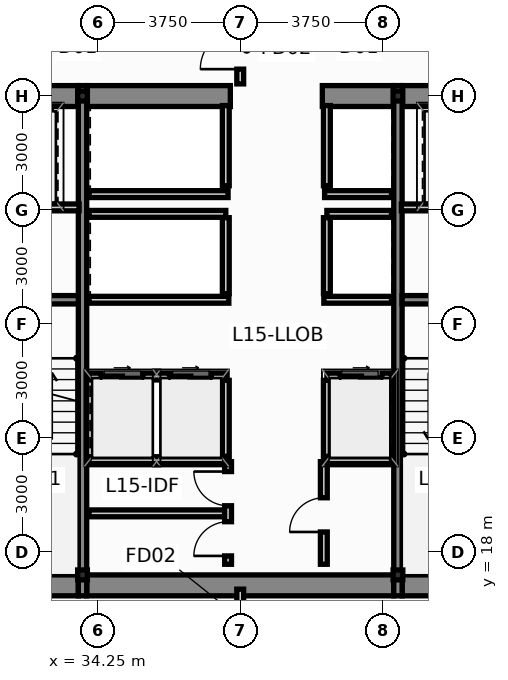
"""IFC4 building model, lengths in metres.
Left out: names, types, materials, properties, quantities, classifications, styles, units other than length and angle.
Written with IfcOpenShell. Run it as: python <this file> out.ifc"""

import sys

from ifc_helpers import new_model, si_unit, direction, frame, frame_2d, origin, origin_2d, place, context, subcontext, project, spatial, rectangle, i_section, extrude, source, transform, mapped, element, fill, save


model = new_model("IFC4")
c1 = context("Model", 3, precision=1e-05, world=origin(), true_north=direction((0.0, 1.0)))
c2 = subcontext(c1, "Body", "Model", "MODEL_VIEW")
j1 = project(units=[si_unit("LENGTHUNIT", "METRE"), si_unit("PLANEANGLEUNIT", "RADIAN")], contexts=[c1])
p1 = place(None, origin())
s1 = spatial("IfcSite", under=j1, at=p1, CompositionType="ELEMENT")
p2 = place(p1, origin())
s2 = spatial("IfcBuilding", under=s1, at=p2, CompositionType="ELEMENT")
p3 = place(p2, frame((0.0, 0.0, 60.45)))
s3 = spatial("IfcBuildingStorey", under=s2, at=p3, CompositionType="ELEMENT", Elevation=60.45)
m1 = source(origin(), c2, "Body", "SweptSolid", [
    extrude(i_section(OverallWidth=0.256, OverallDepth=0.26, WebThickness=0.01, FlangeThickness=0.017, at=origin_2d()), origin(), (0.0, 0.0, 1.0), 3.65),
])
for number, where, z_axis, x_axis in (
    (1, (33.85, 17.4, 0.0), (0.0, 0.0, 1.0), (1.0, 0.0, 0.0)),
    (2, (42.15, 17.4, 0.0), (0.0, 0.0, 1.0), (1.0, 0.0, 0.0)),
    (3, (33.85, 30.0, 0.0), (0.0, 0.0, 1.0), (1.0, 0.0, 0.0)),
    (4, (42.15, 30.0, 0.0), (0.0, 0.0, 1.0), (1.0, 0.0, 0.0)),
):
    element("IfcColumn", number, at=place(p3, frame(where, z_axis=z_axis, x_axis=x_axis)), inside=s3, PredefinedType="COLUMN", context=c2, shape_type="MappedRepresentation", body=[
        mapped(m1, transform((0.0, 0.0, 0.0), scale=1.0)),
    ])
p4 = place(p3, frame((30.84, 17.125, 0.0), z_axis=(0.0, 0.0, 1.0), x_axis=(1.0, 0.0, 0.0)))
e5 = element("IfcWall", 5, at=p4, inside=s3, PredefinedType="SHEAR", context=c2, shape_type="SweptSolid", body=[
    extrude(rectangle(XDim=2.9, YDim=0.55, at=frame_2d((1.45, 0.0))), origin(), (0.0, 0.0, 1.0), 3.65),
])
p5 = place(p3, frame((33.96, 17.125, 0.0), z_axis=(0.0, 0.0, 1.0), x_axis=(1.0, 0.0, 0.0)))
e6 = element("IfcWall", 6, at=p5, inside=s3, PredefinedType="SHEAR", context=c2, shape_type="SweptSolid", body=[
    extrude(rectangle(XDim=8.08, YDim=0.55, at=frame_2d((4.04, 0.0))), origin(), (0.0, 0.0, 1.0), 3.65),
])
for number, where, z_axis, x_axis in (
    (7, (42.26, 17.125, 0.0), (0.0, 0.0, 1.0), (1.0, 0.0, 0.0)),
    (8, (30.84, 30.0, 0.0), (0.0, 0.0, 1.0), (1.0, 0.0, 0.0)),
):
    element("IfcWall", number, at=place(p3, frame(where, z_axis=z_axis, x_axis=x_axis)), inside=s3, PredefinedType="SHEAR", context=c2, shape_type="SweptSolid", body=[
        extrude(rectangle(XDim=2.9, YDim=0.55, at=frame_2d((1.45, 0.0))), origin(), (0.0, 0.0, 1.0), 3.65),
    ])
p6 = place(p3, frame((33.96, 30.0, 0.0), z_axis=(0.0, 0.0, 1.0), x_axis=(1.0, 0.0, 0.0)))
e9 = element("IfcWall", 9, at=p6, inside=s3, PredefinedType="SHEAR", context=c2, shape_type="SweptSolid", body=[
    extrude(rectangle(XDim=3.78, YDim=0.55, at=frame_2d((1.89, 0.0))), origin(), (0.0, 0.0, 1.0), 3.65),
])
p7 = place(p3, frame((40.16, 30.0, 0.0), z_axis=(0.0, 0.0, 1.0), x_axis=(1.0, 0.0, 0.0)))
e10 = element("IfcWall", 10, at=p7, inside=s3, PredefinedType="SHEAR", context=c2, shape_type="SweptSolid", body=[
    extrude(rectangle(XDim=1.88, YDim=0.55, at=frame_2d((0.94, 0.0))), origin(), (0.0, 0.0, 1.0), 3.65),
])
p8 = place(p3, frame((42.26, 30.0, 0.0), z_axis=(0.0, 0.0, 1.0), x_axis=(1.0, 0.0, 0.0)))
e11 = element("IfcWall", 11, at=p8, inside=s3, PredefinedType="SHEAR", context=c2, shape_type="SweptSolid", body=[
    extrude(rectangle(XDim=2.9, YDim=0.55, at=frame_2d((1.45, 0.0))), origin(), (0.0, 0.0, 1.0), 3.65),
])
for number, where, z_axis, x_axis in (
    (12, (33.85, 16.85, 0.0), (0.0, 0.0, 1.0), (0.0, 1.0, 0.0)),
    (13, (42.15, 16.85, 0.0), (0.0, 0.0, 1.0), (0.0, 1.0, 0.0)),
):
    element("IfcWall", number, at=place(p3, frame(where, z_axis=z_axis, x_axis=x_axis)), inside=s3, PredefinedType="SHEAR", context=c2, shape_type="SweptSolid", body=[
        extrude(rectangle(XDim=13.425, YDim=0.22, at=frame_2d((6.712, 0.0))), origin(), (0.0, 0.0, 1.0), 3.65),
    ])
for number, where, z_axis, x_axis in (
    (14, (30.84, 24.64, 0.0), (0.0, 0.0, 1.0), (1.0, 0.0, 0.0)),
    (15, (42.26, 24.64, 0.0), (0.0, 0.0, 1.0), (1.0, 0.0, 0.0)),
):
    element("IfcWall", number, at=place(p3, frame(where, z_axis=z_axis, x_axis=x_axis)), inside=s3, PredefinedType="SHEAR", context=c2, shape_type="SweptSolid", body=[
        extrude(rectangle(XDim=2.9, YDim=0.22, at=frame_2d((1.45, 0.0))), origin(), (0.0, 0.0, 1.0), 3.65),
    ])
p9 = place(p3, frame((34.02, 22.62, 0.0), z_axis=(0.0, 0.0, 1.0), x_axis=(1.0, 0.0, 0.0)))
e16 = element("IfcWall", 16, at=p9, inside=s3, PredefinedType="PARTITIONING", context=c2, shape_type="SweptSolid", body=[
    extrude(rectangle(XDim=3.6, YDim=0.18, at=frame_2d((1.8, 0.0))), origin(), (0.0, 0.0, 1.0), 3.4),
])
p10 = place(p9, frame((0.32, 0.0, 0.0)))
e17 = element("IfcOpeningElement", 17, at=p10, cuts=e16, PredefinedType="OPENING", context=c2, shape_type="SweptSolid", body=[
    extrude(rectangle(XDim=1.1, YDim=2.2, at=frame_2d((0.55, 1.1))), frame((0.0, 0.102, 0.0), z_axis=(0.0, -1.0, 0.0), x_axis=(1.0, 0.0, 0.0)), (0.0, 0.0, 1.0), 0.204),
])
p11 = place(p9, frame((2.12, 0.0, 0.0)))
e18 = element("IfcOpeningElement", 18, at=p11, cuts=e16, PredefinedType="OPENING", context=c2, shape_type="SweptSolid", body=[
    extrude(rectangle(XDim=1.1, YDim=2.2, at=frame_2d((0.55, 1.1))), frame((0.0, 0.102, 0.0), z_axis=(0.0, -1.0, 0.0), x_axis=(1.0, 0.0, 0.0)), (0.0, 0.0, 1.0), 0.204),
])
p12 = place(p3, frame((40.28, 22.62, 0.0), z_axis=(0.0, 0.0, 1.0), x_axis=(1.0, 0.0, 0.0)))
e19 = element("IfcWall", 19, at=p12, inside=s3, PredefinedType="PARTITIONING", context=c2, shape_type="SweptSolid", body=[
    extrude(rectangle(XDim=1.7, YDim=0.18, at=frame_2d((0.85, 0.0))), origin(), (0.0, 0.0, 1.0), 3.4),
])
p13 = place(p12, frame((0.35, 0.0, 0.0)))
e20 = element("IfcOpeningElement", 20, at=p13, cuts=e19, PredefinedType="OPENING", context=c2, shape_type="SweptSolid", body=[
    extrude(rectangle(XDim=1.1, YDim=2.2, at=frame_2d((0.55, 1.1))), frame((0.0, 0.102, 0.0), z_axis=(0.0, -1.0, 0.0), x_axis=(1.0, 0.0, 0.0)), (0.0, 0.0, 1.0), 0.204),
])
for number, where, z_axis, x_axis in (
    (21, (37.62, 20.52, 0.0), (0.0, 0.0, 1.0), (0.0, 1.0, 0.0)),
    (22, (40.28, 20.52, 0.0), (0.0, 0.0, 1.0), (0.0, 1.0, 0.0)),
):
    element("IfcWall", number, at=place(p3, frame(where, z_axis=z_axis, x_axis=x_axis)), inside=s3, PredefinedType="PARTITIONING", context=c2, shape_type="SweptSolid", body=[
        extrude(rectangle(XDim=2.0, YDim=0.18, at=frame_2d((1.0, 0.0))), origin(), (0.0, 0.0, 1.0), 3.4),
    ])
p14 = place(p3, frame((34.02, 26.9, 0.0), z_axis=(0.0, 0.0, 1.0), x_axis=(1.0, 0.0, 0.0)))
e23 = element("IfcWall", 23, at=p14, inside=s3, PredefinedType="PARTITIONING", context=c2, shape_type="SweptSolid", body=[
    extrude(rectangle(XDim=3.6, YDim=0.18, at=frame_2d((1.8, 0.0))), origin(), (0.0, 0.0, 1.0), 3.4),
])
p15 = place(p3, frame((40.28, 26.9, 0.0), z_axis=(0.0, 0.0, 1.0), x_axis=(1.0, 0.0, 0.0)))
e24 = element("IfcWall", 24, at=p15, inside=s3, PredefinedType="PARTITIONING", context=c2, shape_type="SweptSolid", body=[
    extrude(rectangle(XDim=1.7, YDim=0.18, at=frame_2d((0.85, 0.0))), origin(), (0.0, 0.0, 1.0), 3.4),
])
for number, where, z_axis, x_axis in (
    (25, (37.62, 24.8, 0.0), (0.0, 0.0, 1.0), (0.0, 1.0, 0.0)),
    (26, (40.28, 24.8, 0.0), (0.0, 0.0, 1.0), (0.0, 1.0, 0.0)),
):
    element("IfcWall", number, at=place(p3, frame(where, z_axis=z_axis, x_axis=x_axis)), inside=s3, PredefinedType="PARTITIONING", context=c2, shape_type="SweptSolid", body=[
        extrude(rectangle(XDim=2.0, YDim=0.18, at=frame_2d((1.0, 0.0))), origin(), (0.0, 0.0, 1.0), 3.4),
    ])
p16 = place(p3, frame((34.02, 24.64, 0.0), z_axis=(0.0, 0.0, 1.0), x_axis=(1.0, 0.0, 0.0)))
e27 = element("IfcWall", 27, at=p16, inside=s3, PredefinedType="PARTITIONING", context=c2, shape_type="SweptSolid", body=[
    extrude(rectangle(XDim=3.68, YDim=0.18, at=frame_2d((1.84, 0.0))), origin(), (0.0, 0.0, 1.0), 3.4),
])
p17 = place(p3, frame((40.2, 24.64, 0.0), z_axis=(0.0, 0.0, 1.0), x_axis=(1.0, 0.0, 0.0)))
e28 = element("IfcWall", 28, at=p17, inside=s3, PredefinedType="PARTITIONING", context=c2, shape_type="SweptSolid", body=[
    extrude(rectangle(XDim=1.78, YDim=0.18, at=frame_2d((0.89, 0.0))), origin(), (0.0, 0.0, 1.0), 3.4),
])
p18 = place(p3, frame((34.02, 27.42, 0.0), z_axis=(0.0, 0.0, 1.0), x_axis=(1.0, 0.0, 0.0)))
e29 = element("IfcWall", 29, at=p18, inside=s3, PredefinedType="PARTITIONING", context=c2, shape_type="SweptSolid", body=[
    extrude(rectangle(XDim=3.66, YDim=0.18, at=frame_2d((1.83, 0.0))), origin(), (0.0, 0.0, 1.0), 3.4),
])
p19 = place(p3, frame((40.22, 27.42, 0.0), z_axis=(0.0, 0.0, 1.0), x_axis=(1.0, 0.0, 0.0)))
e30 = element("IfcWall", 30, at=p19, inside=s3, PredefinedType="PARTITIONING", context=c2, shape_type="SweptSolid", body=[
    extrude(rectangle(XDim=1.76, YDim=0.18, at=frame_2d((0.88, 0.0))), origin(), (0.0, 0.0, 1.0), 3.4),
])
for number, where, z_axis, x_axis in (
    (31, (37.62, 27.64, 0.0), (0.0, 0.0, 1.0), (0.0, 1.0, 0.0)),
    (32, (40.28, 27.64, 0.0), (0.0, 0.0, 1.0), (0.0, 1.0, 0.0)),
):
    element("IfcWall", number, at=place(p3, frame(where, z_axis=z_axis, x_axis=x_axis)), inside=s3, PredefinedType="PARTITIONING", context=c2, shape_type="SweptSolid", body=[
        extrude(rectangle(XDim=2.11, YDim=0.18, at=frame_2d((1.055, 0.0))), origin(), (0.0, 0.0, 1.0), 3.4),
    ])
for number, where, z_axis, x_axis in (
    (33, (30.86, 27.07, 0.0), (0.0, 0.0, 1.0), (1.0, 0.0, 0.0)),
    (34, (42.24, 27.07, 0.0), (0.0, 0.0, 1.0), (1.0, 0.0, 0.0)),
):
    element("IfcWall", number, at=place(p3, frame(where, z_axis=z_axis, x_axis=x_axis)), inside=s3, PredefinedType="PARTITIONING", context=c2, shape_type="SweptSolid", body=[
        extrude(rectangle(XDim=2.9, YDim=0.18, at=frame_2d((1.45, 0.0))), origin(), (0.0, 0.0, 1.0), 3.4),
    ])
p20 = place(p3, frame((34.02, 20.42, 0.0), z_axis=(0.0, 0.0, 1.0), x_axis=(1.0, 0.0, 0.0)))
e35 = element("IfcWall", 35, at=p20, inside=s3, PredefinedType="PARTITIONING", context=c2, shape_type="SweptSolid", body=[
    extrude(rectangle(XDim=3.64, YDim=0.18, at=frame_2d((1.82, 0.0))), origin(), (0.0, 0.0, 1.0), 3.4),
])
p21 = place(p3, frame((40.22, 20.42, 0.0), z_axis=(0.0, 0.0, 1.0), x_axis=(1.0, 0.0, 0.0)))
e36 = element("IfcWall", 36, at=p21, inside=s3, PredefinedType="PARTITIONING", context=c2, shape_type="SweptSolid", body=[
    extrude(rectangle(XDim=1.76, YDim=0.18, at=frame_2d((0.88, 0.0))), origin(), (0.0, 0.0, 1.0), 3.4),
])
p22 = place(p3, frame((34.02, 19.02, 0.0), z_axis=(0.0, 0.0, 1.0), x_axis=(1.0, 0.0, 0.0)))
e37 = element("IfcWall", 37, at=p22, inside=s3, PredefinedType="PARTITIONING", context=c2, shape_type="SweptSolid", body=[
    extrude(rectangle(XDim=3.58, YDim=0.18, at=frame_2d((1.79, 0.0))), origin(), (0.0, 0.0, 1.0), 3.4),
])
p23 = place(p3, frame((37.68, 17.68, 0.0), z_axis=(0.0, 0.0, 1.0), x_axis=(0.0, 1.0, 0.0)))
e38 = element("IfcWall", 38, at=p23, inside=s3, PredefinedType="PARTITIONING", context=c2, shape_type="SweptSolid", body=[
    extrude(rectangle(XDim=2.7, YDim=0.18, at=frame_2d((1.35, 0.0))), origin(), (0.0, 0.0, 1.0), 3.4),
])
p24 = place(p23, frame((0.22, 0.0, 0.0)))
e39 = element("IfcOpeningElement", 39, at=p24, cuts=e38, PredefinedType="OPENING", context=c2, shape_type="SweptSolid", body=[
    extrude(rectangle(XDim=0.9, YDim=2.1, at=frame_2d((0.45, 1.05))), frame((0.0, 0.102, 0.0), z_axis=(0.0, -1.0, 0.0), x_axis=(1.0, 0.0, 0.0)), (0.0, 0.0, 1.0), 0.204),
])
p25 = place(p23, frame((1.54, 0.0, 0.0)))
e40 = element("IfcOpeningElement", 40, at=p25, cuts=e38, PredefinedType="OPENING", context=c2, shape_type="SweptSolid", body=[
    extrude(rectangle(XDim=0.9, YDim=2.1, at=frame_2d((0.45, 1.05))), frame((0.0, 0.102, 0.0), z_axis=(0.0, -1.0, 0.0), x_axis=(1.0, 0.0, 0.0)), (0.0, 0.0, 1.0), 0.204),
])
p26 = place(p3, frame((40.2, 17.68, 0.0), z_axis=(0.0, 0.0, 1.0), x_axis=(0.0, 1.0, 0.0)))
e41 = element("IfcWall", 41, at=p26, inside=s3, PredefinedType="PARTITIONING", context=c2, shape_type="SweptSolid", body=[
    extrude(rectangle(XDim=2.7, YDim=0.18, at=frame_2d((1.35, 0.0))), origin(), (0.0, 0.0, 1.0), 3.4),
])
p27 = place(p26, frame((0.85, 0.0, 0.0)))
e42 = element("IfcOpeningElement", 42, at=p27, cuts=e41, PredefinedType="OPENING", context=c2, shape_type="SweptSolid", body=[
    extrude(rectangle(XDim=0.9, YDim=2.1, at=frame_2d((0.45, 1.05))), frame((0.0, 0.102, 0.0), z_axis=(0.0, -1.0, 0.0), x_axis=(1.0, 0.0, 0.0)), (0.0, 0.0, 1.0), 0.204),
])
p28 = place(p3, frame((38.0, 15.205, 0.0), z_axis=(0.0, 0.0, 1.0), x_axis=(0.0, 1.0, 0.0)))
e43 = element("IfcWall", 43, at=p28, inside=s3, PredefinedType="PARTITIONING", context=c2, shape_type="SweptSolid", body=[
    extrude(rectangle(XDim=1.82, YDim=0.18, at=frame_2d((0.91, 0.0))), origin(), (0.0, 0.0, 1.0), 3.4),
])
p29 = place(p28, frame((0.385, 0.0, 0.0)))
e44 = element("IfcOpeningElement", 44, at=p29, cuts=e43, PredefinedType="OPENING", context=c2, shape_type="SweptSolid", body=[
    extrude(rectangle(XDim=1.05, YDim=2.15, at=frame_2d((0.525, 1.075))), frame((0.0, 0.102, 0.0), z_axis=(0.0, -1.0, 0.0), x_axis=(1.0, 0.0, 0.0)), (0.0, 0.0, 1.0), 0.204),
])
p30 = place(p3, frame((38.0, 30.32, 0.0), z_axis=(0.0, 0.0, 1.0), x_axis=(0.0, 1.0, 0.0)))
e45 = element("IfcWall", 45, at=p30, inside=s3, PredefinedType="PARTITIONING", context=c2, shape_type="SweptSolid", body=[
    extrude(rectangle(XDim=1.825, YDim=0.18, at=frame_2d((0.913, 0.0))), origin(), (0.0, 0.0, 1.0), 3.4),
])
p31 = place(p30, frame((0.388, 0.0, 0.0)))
e46 = element("IfcOpeningElement", 46, at=p31, cuts=e45, PredefinedType="OPENING", context=c2, shape_type="SweptSolid", body=[
    extrude(rectangle(XDim=1.05, YDim=2.15, at=frame_2d((0.525, 1.075))), frame((0.0, 0.102, 0.0), z_axis=(0.0, -1.0, 0.0), x_axis=(1.0, 0.0, 0.0)), (0.0, 0.0, 1.0), 0.204),
])
p32 = place(p10, origin())
e47 = element("IfcDoor", 47, at=p32, inside=s3, OperationType="SLIDING_TO_LEFT", PredefinedType="DOOR", context=c2, shape_type="SweptSolid", body=[
    extrude(rectangle(XDim=1.1, YDim=2.2, at=frame_2d((0.55, 1.1))), frame((0.0, 0.025, 0.0), z_axis=(0.0, -1.0, 0.0), x_axis=(1.0, 0.0, 0.0)), (0.0, 0.0, 1.0), 0.05),
])
fill(e17, e47)
p33 = place(p11, origin())
e48 = element("IfcDoor", 48, at=p33, inside=s3, OperationType="SLIDING_TO_RIGHT", PredefinedType="DOOR", context=c2, shape_type="SweptSolid", body=[
    extrude(rectangle(XDim=1.1, YDim=2.2, at=frame_2d((0.55, 1.1))), frame((0.0, 0.025, 0.0), z_axis=(0.0, -1.0, 0.0), x_axis=(1.0, 0.0, 0.0)), (0.0, 0.0, 1.0), 0.05),
])
fill(e18, e48)
p34 = place(p13, origin())
e49 = element("IfcDoor", 49, at=p34, inside=s3, OperationType="SLIDING_TO_LEFT", PredefinedType="DOOR", context=c2, shape_type="SweptSolid", body=[
    extrude(rectangle(XDim=1.1, YDim=2.2, at=frame_2d((0.55, 1.1))), frame((0.0, 0.025, 0.0), z_axis=(0.0, -1.0, 0.0), x_axis=(1.0, 0.0, 0.0)), (0.0, 0.0, 1.0), 0.05),
])
fill(e20, e49)
p35 = place(p24, origin())
e50 = element("IfcDoor", 50, at=p35, inside=s3, OperationType="SINGLE_SWING_LEFT", PredefinedType="DOOR", context=c2, shape_type="SweptSolid", body=[
    extrude(rectangle(XDim=0.9, YDim=2.1, at=frame_2d((0.45, 1.05))), frame((0.0, 0.025, 0.0), z_axis=(0.0, -1.0, 0.0), x_axis=(1.0, 0.0, 0.0)), (0.0, 0.0, 1.0), 0.05),
])
fill(e39, e50)
p36 = place(p25, origin())
e51 = element("IfcDoor", 51, at=p36, inside=s3, OperationType="SINGLE_SWING_RIGHT", PredefinedType="DOOR", context=c2, shape_type="SweptSolid", body=[
    extrude(rectangle(XDim=0.9, YDim=2.1, at=frame_2d((0.45, 1.05))), frame((0.0, 0.025, 0.0), z_axis=(0.0, -1.0, 0.0), x_axis=(1.0, 0.0, 0.0)), (0.0, 0.0, 1.0), 0.05),
])
fill(e40, e51)
p37 = place(p27, origin())
e52 = element("IfcDoor", 52, at=p37, inside=s3, OperationType="SINGLE_SWING_LEFT", PredefinedType="DOOR", context=c2, shape_type="SweptSolid", body=[
    extrude(rectangle(XDim=0.9, YDim=2.1, at=frame_2d((0.45, 1.05))), frame((0.0, 0.025, 0.0), z_axis=(0.0, -1.0, 0.0), x_axis=(1.0, 0.0, 0.0)), (0.0, 0.0, 1.0), 0.05),
])
fill(e42, e52)
p38 = place(p31, origin())
e53 = element("IfcDoor", 53, at=p38, inside=s3, OperationType="SINGLE_SWING_LEFT", PredefinedType="DOOR", context=c2, shape_type="SweptSolid", body=[
    extrude(rectangle(XDim=1.05, YDim=2.15, at=frame_2d((0.525, 1.075))), frame((0.0, 0.025, 0.0), z_axis=(0.0, -1.0, 0.0), x_axis=(1.0, 0.0, 0.0)), (0.0, 0.0, 1.0), 0.05),
])
fill(e46, e53)
save(model, sys.argv[1])
